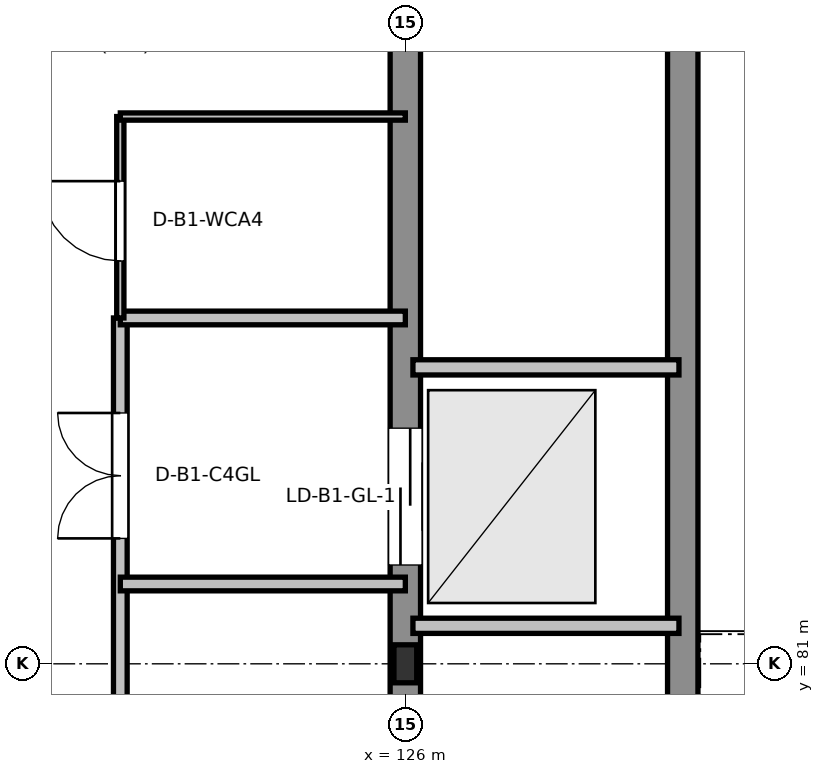
"""IFC4 building model, lengths in metres.
Left out: names, types, materials, properties, quantities, classifications, styles, units other than length and angle.
Written with IfcOpenShell. Run it as: python <this file> out.ifc"""

import sys

from ifc_helpers import new_model, si_unit, direction, frame, frame_2d, origin, origin_2d, place, context, subcontext, project, spatial, rectangle, i_section, extrude, element, fill, save


model = new_model("IFC4")
c1 = context("Model", 3, precision=1e-05, world=origin(), true_north=direction((0.0, 1.0)))
c2 = subcontext(c1, "Body", "Model", "MODEL_VIEW")
j1 = project(units=[si_unit("LENGTHUNIT", "METRE"), si_unit("PLANEANGLEUNIT", "RADIAN")], contexts=[c1])
p1 = place(None, origin())
s1 = spatial("IfcSite", under=j1, at=p1, CompositionType="ELEMENT")
p2 = place(p1, origin())
s2 = spatial("IfcBuilding", under=s1, at=p2, CompositionType="ELEMENT")
p3 = place(p2, frame((0.0, 0.0, -4.8)))
s3 = spatial("IfcBuildingStorey", under=s2, at=p3, CompositionType="ELEMENT", Elevation=-4.8)
p4 = place(p3, frame((126.0, 81.0, 0.0), z_axis=(0.0, 0.0, 1.0), x_axis=(1.0, 0.0, 0.0)))
e1 = element("IfcColumn", 1, at=p4, inside=s3, PredefinedType="COLUMN", context=c2, shape_type="SweptSolid", body=[
    extrude(i_section(OverallWidth=0.3, OverallDepth=0.5, WebThickness=0.014, FlangeThickness=0.028, at=origin_2d()), origin(), (0.0, 0.0, 1.0), 4.8),
])
p5 = place(p3, frame((126.0, 90.0, 0.0), z_axis=(0.0, 0.0, 1.0), x_axis=(0.0, -1.0, 0.0)))
e2 = element("IfcWall", 2, at=p5, inside=s3, PredefinedType="SHEAR", context=c2, shape_type="SweptSolid", body=[
    extrude(rectangle(XDim=18.0, YDim=0.4, at=frame_2d((9.0, 0.0))), origin(), (0.0, 0.0, 1.0), 4.55),
])
p6 = place(p5, frame((16.1, 0.0, 0.0)))
e3 = element("IfcOpeningElement", 3, at=p6, cuts=e2, PredefinedType="OPENING", context=c2, shape_type="SweptSolid", body=[
    extrude(rectangle(XDim=1.1, YDim=2.16, at=frame_2d((0.55, 1.08))), frame((0.0, 0.21, 0.0), z_axis=(0.0, -1.0, 0.0), x_axis=(1.0, 0.0, 0.0)), (0.0, 0.0, 1.0), 0.42),
])
p7 = place(p5, frame((13.45, 0.0, 0.0)))
e4 = element("IfcOpeningElement", 4, at=p7, cuts=e2, PredefinedType="OPENING", context=c2, shape_type="SweptSolid", body=[
    extrude(rectangle(XDim=1.2, YDim=2.2, at=frame_2d((0.6, 1.1))), frame((0.0, 0.21, 0.0), z_axis=(0.0, -1.0, 0.0), x_axis=(1.0, 0.0, 0.0)), (0.0, 0.0, 1.0), 0.42),
])
p8 = place(p5, frame((10.65, 0.0, 0.0)))
e5 = element("IfcOpeningElement", 5, at=p8, cuts=e2, PredefinedType="OPENING", context=c2, shape_type="SweptSolid", body=[
    extrude(rectangle(XDim=1.2, YDim=2.2, at=frame_2d((0.6, 1.1))), frame((0.0, 0.21, 0.0), z_axis=(0.0, -1.0, 0.0), x_axis=(1.0, 0.0, 0.0)), (0.0, 0.0, 1.0), 0.42),
])
p9 = place(p5, frame((5.9, 0.0, 0.0)))
e6 = element("IfcOpeningElement", 6, at=p9, cuts=e2, PredefinedType="OPENING", context=c2, shape_type="SweptSolid", body=[
    extrude(rectangle(XDim=1.8, YDim=2.35, at=frame_2d((0.9, 1.175))), frame((0.0, 0.21, 0.0), z_axis=(0.0, -1.0, 0.0), x_axis=(1.0, 0.0, 0.0)), (0.0, 0.0, 1.0), 0.42),
])
p10 = place(p3, frame((129.65, 72.0, 0.0), z_axis=(0.0, 0.0, 1.0), x_axis=(0.0, 1.0, 0.0)))
e7 = element("IfcWall", 7, at=p10, inside=s3, PredefinedType="SHEAR", context=c2, shape_type="SweptSolid", body=[
    extrude(rectangle(XDim=18.0, YDim=0.4, at=frame_2d((9.0, 0.0))), origin(), (0.0, 0.0, 1.0), 4.55),
])
p11 = place(p10, frame((0.7, 0.0, 0.0)))
e8 = element("IfcOpeningElement", 8, at=p11, cuts=e7, PredefinedType="OPENING", context=c2, shape_type="SweptSolid", body=[
    extrude(rectangle(XDim=1.1, YDim=2.16, at=frame_2d((0.55, 1.08))), frame((0.0, 0.21, 0.0), z_axis=(0.0, -1.0, 0.0), x_axis=(1.0, 0.0, 0.0)), (0.0, 0.0, 1.0), 0.42),
])
for number, where, z_axis, x_axis in (
    (9, (126.1, 81.5, 0.0), (0.0, 0.0, 1.0), (1.0, 0.0, 0.0)),
    (10, (126.1, 84.9, 0.0), (0.0, 0.0, 1.0), (1.0, 0.0, 0.0)),
):
    element("IfcWall", number, at=place(p3, frame(where, z_axis=z_axis, x_axis=x_axis)), inside=s3, PredefinedType="PARTITIONING", context=c2, shape_type="SweptSolid", body=[
        extrude(rectangle(XDim=3.5, YDim=0.2, at=frame_2d((1.75, 0.0))), origin(), (0.0, 0.0, 1.0), 4.55),
    ])
p12 = place(p3, frame((122.25, 72.0, 0.0), z_axis=(0.0, 0.0, 1.0), x_axis=(0.0, 1.0, 0.0)))
e11 = element("IfcWall", 11, at=p12, inside=s3, PredefinedType="PARTITIONING", context=c2, shape_type="SweptSolid", body=[
    extrude(rectangle(XDim=13.55, YDim=0.18, at=frame_2d((6.775, 0.0))), origin(), (0.0, 0.0, 1.0), 4.55),
])
p13 = place(p12, frame((0.75, 0.0, 0.0)))
e12 = element("IfcOpeningElement", 12, at=p13, cuts=e11, PredefinedType="OPENING", context=c2, shape_type="SweptSolid", body=[
    extrude(rectangle(XDim=1.1, YDim=2.16, at=frame_2d((0.55, 1.08))), frame((0.0, 0.1, 0.0), z_axis=(0.0, -1.0, 0.0), x_axis=(1.0, 0.0, 0.0)), (0.0, 0.0, 1.0), 0.2),
])
p14 = place(p12, frame((3.2, 0.0, 0.0)))
e13 = element("IfcOpeningElement", 13, at=p14, cuts=e11, PredefinedType="OPENING", context=c2, shape_type="SweptSolid", body=[
    extrude(rectangle(XDim=1.4, YDim=2.2, at=frame_2d((0.7, 1.1))), frame((0.0, 0.1, 0.0), z_axis=(0.0, -1.0, 0.0), x_axis=(1.0, 0.0, 0.0)), (0.0, 0.0, 1.0), 0.2),
])
p15 = place(p12, frame((6.65, 0.0, 0.0)))
e14 = element("IfcOpeningElement", 14, at=p15, cuts=e11, PredefinedType="OPENING", context=c2, shape_type="SweptSolid", body=[
    extrude(rectangle(XDim=1.4, YDim=2.2, at=frame_2d((0.7, 1.1))), frame((0.0, 0.1, 0.0), z_axis=(0.0, -1.0, 0.0), x_axis=(1.0, 0.0, 0.0)), (0.0, 0.0, 1.0), 0.2),
])
p16 = place(p12, frame((10.65, 0.0, 0.0)))
e15 = element("IfcOpeningElement", 15, at=p16, cuts=e11, PredefinedType="OPENING", context=c2, shape_type="SweptSolid", body=[
    extrude(rectangle(XDim=1.65, YDim=2.25, at=frame_2d((0.825, 1.125))), frame((0.0, 0.1, 0.0), z_axis=(0.0, -1.0, 0.0), x_axis=(1.0, 0.0, 0.0)), (0.0, 0.0, 1.0), 0.2),
])
for number, where, z_axis, x_axis in (
    (16, (122.25, 82.05, 0.0), (0.0, 0.0, 1.0), (1.0, 0.0, 0.0)),
    (17, (122.25, 85.55, 0.0), (0.0, 0.0, 1.0), (1.0, 0.0, 0.0)),
):
    element("IfcWall", number, at=place(p3, frame(where, z_axis=z_axis, x_axis=x_axis)), inside=s3, PredefinedType="PARTITIONING", context=c2, shape_type="SweptSolid", body=[
        extrude(rectangle(XDim=3.75, YDim=0.18, at=frame_2d((1.875, 0.0))), origin(), (0.0, 0.0, 1.0), 4.55),
    ])
p17 = place(p3, frame((122.25, 85.55, 0.0), z_axis=(0.0, 0.0, 1.0), x_axis=(0.0, 1.0, 0.0)))
e18 = element("IfcWall", 18, at=p17, inside=s3, PredefinedType="PARTITIONING", context=c2, shape_type="SweptSolid", body=[
    extrude(rectangle(XDim=2.65, YDim=0.095, at=frame_2d((1.325, 0.0))), origin(), (0.0, 0.0, 1.0), 4.55),
])
p18 = place(p17, frame((0.75, 0.0, 0.0)))
e19 = element("IfcOpeningElement", 19, at=p18, cuts=e18, PredefinedType="OPENING", context=c2, shape_type="SweptSolid", body=[
    extrude(rectangle(XDim=1.05, YDim=2.13, at=frame_2d((0.525, 1.065))), frame((0.0, 0.057, 0.0), z_axis=(0.0, -1.0, 0.0), x_axis=(1.0, 0.0, 0.0)), (0.0, 0.0, 1.0), 0.115),
])
p19 = place(p3, frame((122.25, 88.2, 0.0), z_axis=(0.0, 0.0, 1.0), x_axis=(1.0, 0.0, 0.0)))
e20 = element("IfcWall", 20, at=p19, inside=s3, PredefinedType="PARTITIONING", context=c2, shape_type="SweptSolid", body=[
    extrude(rectangle(XDim=3.75, YDim=0.095, at=frame_2d((1.875, 0.0))), origin(), (0.0, 0.0, 1.0), 4.55),
])
p20 = place(p9, origin())
e21 = element("IfcDoor", 21, at=p20, inside=s3, OperationType="DOUBLE_DOOR_SLIDING", PredefinedType="DOOR", context=c2, shape_type="SweptSolid", body=[
    extrude(rectangle(XDim=1.8, YDim=2.35, at=frame_2d((0.9, 1.175))), frame((0.0, 0.025, 0.0), z_axis=(0.0, -1.0, 0.0), x_axis=(1.0, 0.0, 0.0)), (0.0, 0.0, 1.0), 0.05),
])
fill(e6, e21)
p21 = place(p16, origin())
e22 = element("IfcDoor", 22, at=p21, inside=s3, OperationType="DOUBLE_DOOR_SINGLE_SWING", PredefinedType="DOOR", context=c2, shape_type="SweptSolid", body=[
    extrude(rectangle(XDim=1.65, YDim=2.25, at=frame_2d((0.825, 1.125))), frame((0.0, 0.025, 0.0), z_axis=(0.0, -1.0, 0.0), x_axis=(1.0, 0.0, 0.0)), (0.0, 0.0, 1.0), 0.05),
])
fill(e15, e22)
p22 = place(p18, origin())
e23 = element("IfcDoor", 23, at=p22, inside=s3, OperationType="SINGLE_SWING_RIGHT", PredefinedType="DOOR", context=c2, shape_type="SweptSolid", body=[
    extrude(rectangle(XDim=1.05, YDim=2.13, at=frame_2d((0.525, 1.065))), frame((0.0, 0.025, 0.0), z_axis=(0.0, -1.0, 0.0), x_axis=(1.0, 0.0, 0.0)), (0.0, 0.0, 1.0), 0.05),
])
fill(e19, e23)
save(model, sys.argv[1])
